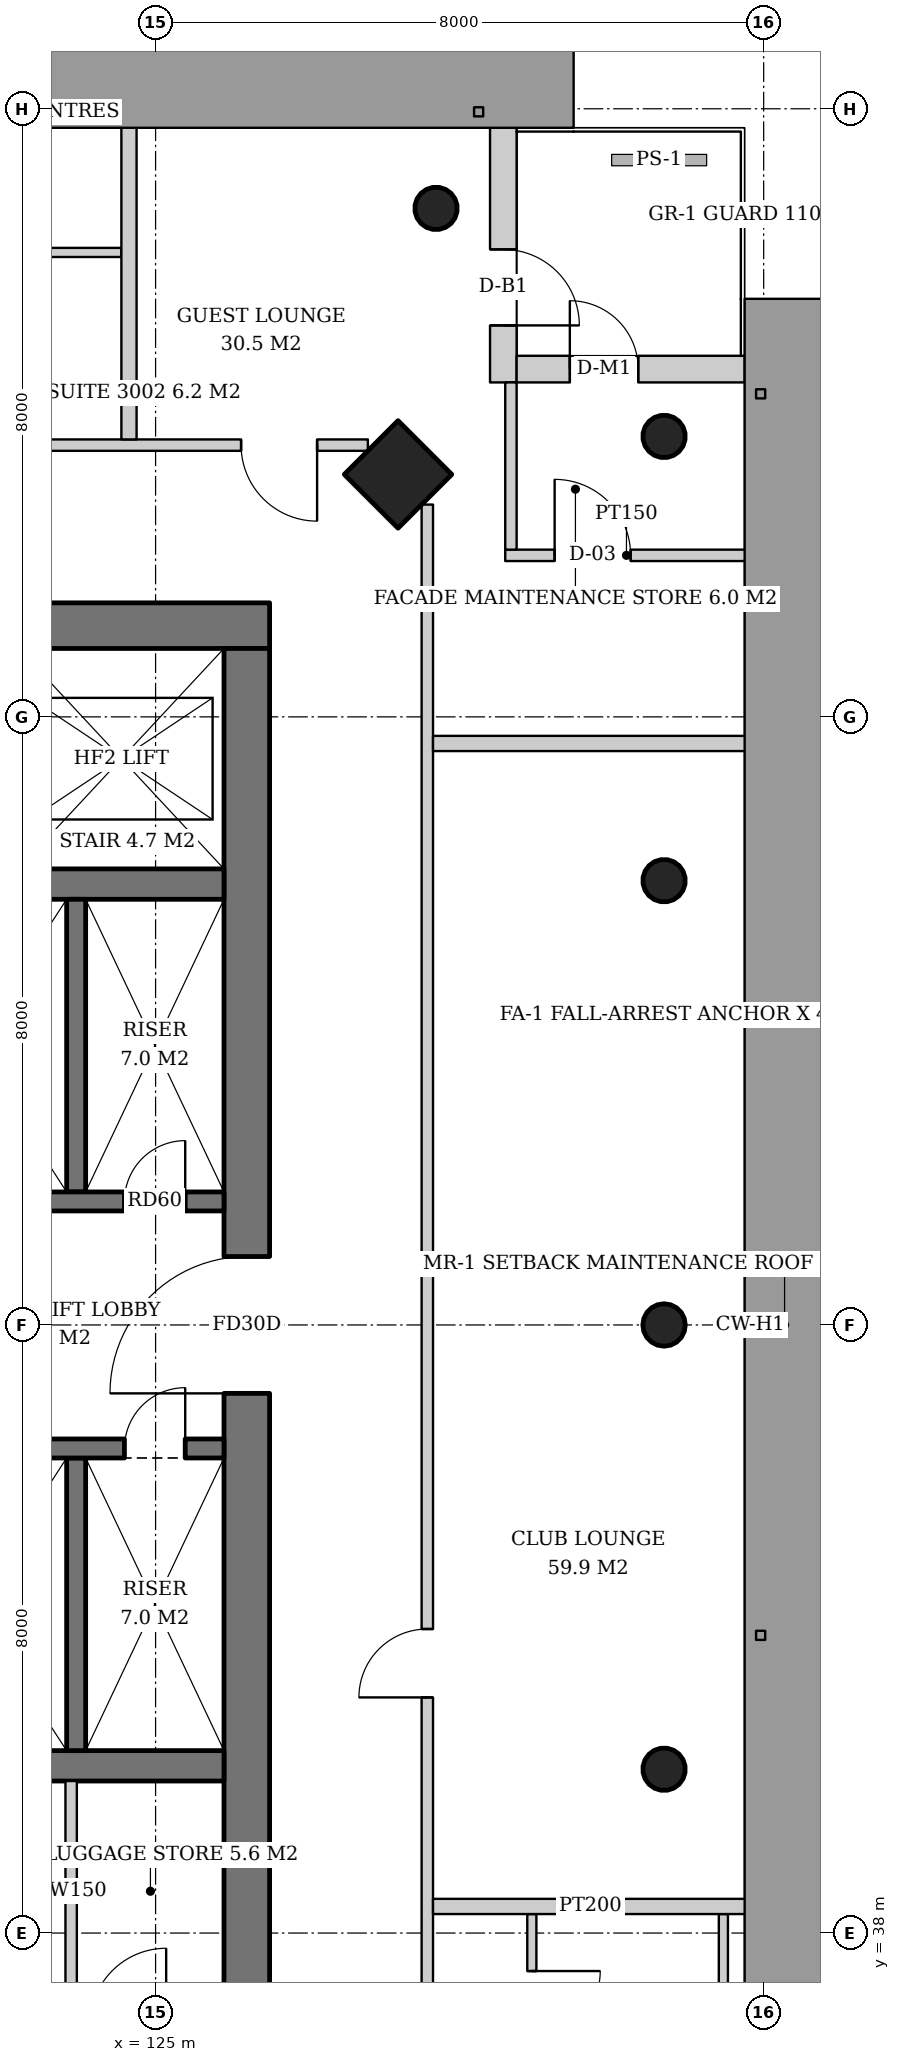
"""IFC4 building model, lengths in metres.
Left out: names, types, materials, properties, quantities, classifications, styles, units other than length and angle.
Written with IfcOpenShell. Run it as: python <this file> out.ifc"""

import sys

from ifc_helpers import new_model, si_unit, direction, frame, frame_2d, origin, origin_2d, place, context, subcontext, project, spatial, rectangle, hollow_circle, extrude, element, fill, save


model = new_model("IFC4")
c1 = context("Model", 3, precision=1e-05, world=origin(), true_north=direction((0.0, 1.0)))
c2 = subcontext(c1, "Body", "Model", "MODEL_VIEW")
j1 = project(units=[si_unit("LENGTHUNIT", "METRE"), si_unit("PLANEANGLEUNIT", "RADIAN")], contexts=[c1])
p1 = place(None, origin())
s1 = spatial("IfcSite", under=j1, at=p1, CompositionType="ELEMENT")
p2 = place(p1, origin())
s2 = spatial("IfcBuilding", under=s1, at=p2, CompositionType="ELEMENT")
p3 = place(p2, frame((0.0, 0.0, 119.8)))
s3 = spatial("IfcBuildingStorey", under=s2, at=p3, CompositionType="ELEMENT", Elevation=119.8)
p4 = place(p3, frame((128.241, 57.241, 0.0), z_axis=(-0.043029647111, -0.043029647111, 0.998146732169), x_axis=(0.707106781187, -0.707106781187, 0.0)))
e1 = element("IfcColumn", 1, at=p4, inside=s3, PredefinedType="COLUMN", context=c2, shape_type="SweptSolid", body=[
    extrude(rectangle(XDim=1.0, YDim=1.0, at=origin_2d()), origin(), (0.0, 0.0, 1.0), 3.807),
])
p5 = place(p3, frame((131.741, 57.741, 0.0), z_axis=(-0.043029647111, -0.043029647111, 0.998146732169), x_axis=(0.707106781187, -0.707106781187, 0.0)))
e2 = element("IfcColumn", 2, at=p5, inside=s3, PredefinedType="COLUMN", context=c2, shape_type="SweptSolid", body=[
    extrude(hollow_circle(Radius=0.28, WallThickness=0.02, at=origin_2d()), origin(), (0.0, 0.0, 1.0), 3.807),
])
p6 = place(p3, frame((131.741, 40.129, 0.0), z_axis=(-0.043059584825, 0.021497706284, 0.998841188968), x_axis=(-0.446680166538, -0.894693706707, 0.0)))
e3 = element("IfcColumn", 3, at=p6, inside=s3, PredefinedType="COLUMN", context=c2, shape_type="SweptSolid", body=[
    extrude(hollow_circle(Radius=0.28, WallThickness=0.02, at=origin_2d()), origin(), (0.0, 0.0, 1.0), 3.804),
])
p7 = place(p3, frame((131.741, 46.0, 0.0), z_axis=(-0.043069538298, 0.0, 0.999072076915), x_axis=(0.0, -1.0, 0.0)))
e4 = element("IfcColumn", 4, at=p7, inside=s3, PredefinedType="COLUMN", context=c2, shape_type="SweptSolid", body=[
    extrude(hollow_circle(Radius=0.28, WallThickness=0.02, at=origin_2d()), origin(), (0.0, 0.0, 1.0), 3.803),
])
p8 = place(p3, frame((131.741, 51.871, 0.0), z_axis=(-0.043059584825, -0.021497706284, 0.998841188968), x_axis=(0.446680166538, -0.894693706707, 0.0)))
e5 = element("IfcColumn", 5, at=p8, inside=s3, PredefinedType="COLUMN", context=c2, shape_type="SweptSolid", body=[
    extrude(hollow_circle(Radius=0.28, WallThickness=0.02, at=origin_2d()), origin(), (0.0, 0.0, 1.0), 3.804),
])
p9 = place(p3, frame((128.741, 60.741, 0.0), z_axis=(-0.043029647111, -0.043029647111, 0.998146732169), x_axis=(0.707106781187, -0.707106781187, 0.0)))
e6 = element("IfcColumn", 6, at=p9, inside=s3, PredefinedType="COLUMN", context=c2, shape_type="SweptSolid", body=[
    extrude(hollow_circle(Radius=0.28, WallThickness=0.02, at=origin_2d()), origin(), (0.0, 0.0, 1.0), 3.807),
])
p10 = place(p3, frame((107.5, 55.2, 0.0), z_axis=(0.0, 0.0, 1.0), x_axis=(1.0, 0.0, 0.0)))
e7 = element("IfcWall", 7, at=p10, inside=s3, PredefinedType="SHEAR", context=c2, shape_type="SweptSolid", body=[
    extrude(rectangle(XDim=19.0, YDim=0.6, at=frame_2d((9.5, 0.0))), origin(), (0.0, 0.0, 1.0), 3.8),
])
p11 = place(p10, frame((14.14, 0.0, 0.0)))
e8 = element("IfcOpeningElement", 8, at=p11, cuts=e7, PredefinedType="OPENING", context=c2, shape_type="SweptSolid", body=[
    extrude(rectangle(XDim=1.0, YDim=2.1, at=frame_2d((0.5, 1.05))), frame((0.0, 0.31, 0.0), z_axis=(0.0, -1.0, 0.0), x_axis=(1.0, 0.0, 0.0)), (0.0, 0.0, 1.0), 0.62),
])
p12 = place(p10, frame((2.425, 0.0, 0.0)))
e9 = element("IfcOpeningElement", 9, at=p12, cuts=e7, PredefinedType="OPENING", context=c2, shape_type="SweptSolid", body=[
    extrude(rectangle(XDim=1.0, YDim=2.1, at=frame_2d((0.5, 1.05))), frame((0.0, 0.31, 0.0), z_axis=(0.0, -1.0, 0.0), x_axis=(1.0, 0.0, 0.0)), (0.0, 0.0, 1.0), 0.62),
])
p13 = place(p3, frame((126.2, 37.1, 0.0), z_axis=(0.0, 0.0, 1.0), x_axis=(0.0, 1.0, 0.0)))
e10 = element("IfcWall", 10, at=p13, inside=s3, PredefinedType="SHEAR", context=c2, shape_type="SweptSolid", body=[
    extrude(rectangle(XDim=17.8, YDim=0.6, at=frame_2d((8.9, 0.0))), origin(), (0.0, 0.0, 1.0), 3.8),
])
p14 = place(p13, frame((8.0, 0.0, 0.0)))
e11 = element("IfcOpeningElement", 11, at=p14, cuts=e10, PredefinedType="OPENING", context=c2, shape_type="SweptSolid", body=[
    extrude(rectangle(XDim=1.8, YDim=2.4, at=frame_2d((0.9, 1.2))), frame((0.0, 0.31, 0.0), z_axis=(0.0, -1.0, 0.0), x_axis=(1.0, 0.0, 0.0)), (0.0, 0.0, 1.0), 0.62),
])
for number, where, z_axis, x_axis in (
    (12, (108.1, 40.2, 0.0), (0.0, 0.0, 1.0), (1.0, 0.0, 0.0)),
    (13, (108.1, 51.8, 0.0), (0.0, 0.0, 1.0), (1.0, 0.0, 0.0)),
):
    element("IfcWall", number, at=place(p3, frame(where, z_axis=z_axis, x_axis=x_axis)), inside=s3, PredefinedType="SHEAR", context=c2, shape_type="SweptSolid", body=[
        extrude(rectangle(XDim=17.8, YDim=0.4, at=frame_2d((8.9, 0.0))), origin(), (0.0, 0.0, 1.0), 3.8),
    ])
p15 = place(p3, frame((129.575, 61.75, 0.0), z_axis=(0.0, 0.0, 1.0), x_axis=(0.0, -1.0, 0.0)))
e14 = element("IfcWall", 14, at=p15, inside=s3, PredefinedType="SOLIDWALL", context=c2, shape_type="SweptSolid", body=[
    extrude(rectangle(XDim=3.35, YDim=0.35, at=frame_2d((1.675, 0.0))), origin(), (0.0, 0.0, 1.0), 3.6),
])
p16 = place(p15, frame((1.6, 0.0, 0.0)))
e15 = element("IfcOpeningElement", 15, at=p16, cuts=e14, PredefinedType="OPENING", context=c2, shape_type="SweptSolid", body=[
    extrude(rectangle(XDim=1.0, YDim=2.4, at=frame_2d((0.5, 1.2))), frame((0.0, 0.185, 0.0), z_axis=(0.0, -1.0, 0.0), x_axis=(1.0, 0.0, 0.0)), (0.0, 0.0, 1.0), 0.37),
])
p17 = place(p3, frame((129.75, 58.575, 0.0), z_axis=(0.0, 0.0, 1.0), x_axis=(1.0, 0.0, 0.0)))
e16 = element("IfcWall", 16, at=p17, inside=s3, PredefinedType="SOLIDWALL", context=c2, shape_type="SweptSolid", body=[
    extrude(rectangle(XDim=3.0, YDim=0.35, at=frame_2d((1.5, 0.0))), origin(), (0.0, 0.0, 1.0), 3.6),
])
p18 = place(p17, frame((0.7, 0.0, 0.0)))
e17 = element("IfcOpeningElement", 17, at=p18, cuts=e16, PredefinedType="OPENING", context=c2, shape_type="SweptSolid", body=[
    extrude(rectangle(XDim=0.9, YDim=2.1, at=frame_2d((0.45, 1.05))), frame((0.0, 0.185, 0.0), z_axis=(0.0, -1.0, 0.0), x_axis=(1.0, 0.0, 0.0)), (0.0, 0.0, 1.0), 0.37),
])
p19 = place(p3, frame((123.955, 47.75, 0.0), z_axis=(0.0, 0.0, 1.0), x_axis=(0.0, 1.0, 0.0)))
e18 = element("IfcWall", 18, at=p19, inside=s3, PredefinedType="SHEAR", context=c2, shape_type="SweptSolid", body=[
    extrude(rectangle(XDim=3.85, YDim=0.25, at=frame_2d((1.925, 0.0))), origin(), (0.0, 0.0, 1.0), 3.8),
])
p20 = place(p3, frame((121.33, 47.625, 0.0), z_axis=(0.0, 0.0, 1.0), x_axis=(1.0, 0.0, 0.0)))
e19 = element("IfcWall", 19, at=p20, inside=s3, PredefinedType="SHEAR", context=c2, shape_type="SweptSolid", body=[
    extrude(rectangle(XDim=4.57, YDim=0.25, at=frame_2d((2.285, 0.0))), origin(), (0.0, 0.0, 1.0), 3.8),
])
p21 = place(p20, frame((0.55, 0.0, 0.0)))
e20 = element("IfcOpeningElement", 20, at=p21, cuts=e19, PredefinedType="OPENING", context=c2, shape_type="SweptSolid", body=[
    extrude(rectangle(XDim=1.4, YDim=2.4, at=frame_2d((0.7, 1.2))), frame((0.0, 0.135, 0.0), z_axis=(0.0, -1.0, 0.0), x_axis=(1.0, 0.0, 0.0)), (0.0, 0.0, 1.0), 0.27),
])
p22 = place(p20, frame((3.26, 0.0, 0.0)))
e21 = element("IfcOpeningElement", 21, at=p22, cuts=e19, PredefinedType="OPENING", context=c2, shape_type="SweptSolid", body=[
    extrude(rectangle(XDim=0.8, YDim=2.0, at=frame_2d((0.4, 1.0))), frame((0.0, 0.135, 0.0), z_axis=(0.0, -1.0, 0.0), x_axis=(1.0, 0.0, 0.0)), (0.0, 0.0, 1.0), 0.27),
])
p23 = place(p3, frame((123.955, 44.25, 0.0), z_axis=(0.0, 0.0, 1.0), x_axis=(0.0, -1.0, 0.0)))
e22 = element("IfcWall", 22, at=p23, inside=s3, PredefinedType="SHEAR", context=c2, shape_type="SweptSolid", body=[
    extrude(rectangle(XDim=3.85, YDim=0.25, at=frame_2d((1.925, 0.0))), origin(), (0.0, 0.0, 1.0), 3.8),
])
p24 = place(p3, frame((121.33, 44.375, 0.0), z_axis=(0.0, 0.0, 1.0), x_axis=(1.0, 0.0, 0.0)))
e23 = element("IfcWall", 23, at=p24, inside=s3, PredefinedType="SHEAR", context=c2, shape_type="SweptSolid", body=[
    extrude(rectangle(XDim=4.57, YDim=0.25, at=frame_2d((2.285, 0.0))), origin(), (0.0, 0.0, 1.0), 3.8),
])
p25 = place(p24, frame((0.55, 0.0, 0.0)))
e24 = element("IfcOpeningElement", 24, at=p25, cuts=e23, PredefinedType="OPENING", context=c2, shape_type="SweptSolid", body=[
    extrude(rectangle(XDim=1.4, YDim=2.4, at=frame_2d((0.7, 1.2))), frame((0.0, 0.135, 0.0), z_axis=(0.0, -1.0, 0.0), x_axis=(1.0, 0.0, 0.0)), (0.0, 0.0, 1.0), 0.27),
])
p26 = place(p24, frame((3.26, 0.0, 0.0)))
e25 = element("IfcOpeningElement", 25, at=p26, cuts=e23, PredefinedType="OPENING", context=c2, shape_type="SweptSolid", body=[
    extrude(rectangle(XDim=0.8, YDim=2.0, at=frame_2d((0.4, 1.0))), frame((0.0, 0.135, 0.0), z_axis=(0.0, -1.0, 0.0), x_axis=(1.0, 0.0, 0.0)), (0.0, 0.0, 1.0), 0.27),
])
p27 = place(p3, frame((123.889, 37.1, 0.0), z_axis=(0.0, 0.0, 1.0), x_axis=(0.0, 1.0, 0.0)))
e26 = element("IfcWall", 26, at=p27, inside=s3, PredefinedType="SOLIDWALL", context=c2, shape_type="SweptSolid", body=[
    extrude(rectangle(XDim=2.9, YDim=0.15, at=frame_2d((1.45, 0.0))), origin(), (0.0, 0.0, 1.0), 3.6),
])
p28 = place(p3, frame((129.95, 38.25, 0.0), z_axis=(0.0, 0.0, 1.0), x_axis=(0.0, -1.0, 0.0)))
e27 = element("IfcWall", 27, at=p28, inside=s3, PredefinedType="PARTITIONING", context=c2, shape_type="SweptSolid", body=[
    extrude(rectangle(XDim=2.58, YDim=0.12, at=frame_2d((1.29, 0.0))), origin(), (0.0, 0.0, 1.0), 2.9),
])
p29 = place(p28, frame((0.75, 0.0, 0.0)))
e28 = element("IfcOpeningElement", 28, at=p29, cuts=e27, PredefinedType="OPENING", context=c2, shape_type="SweptSolid", body=[
    extrude(rectangle(XDim=0.9, YDim=2.1, at=frame_2d((0.45, 1.05))), frame((0.0, 0.07, 0.0), z_axis=(0.0, -1.0, 0.0), x_axis=(1.0, 0.0, 0.0)), (0.0, 0.0, 1.0), 0.14),
])
p30 = place(p3, frame((132.47, 38.25, 0.0), z_axis=(0.0, 0.0, 1.0), x_axis=(0.0, -1.0, 0.0)))
e29 = element("IfcWall", 29, at=p30, inside=s3, PredefinedType="PARTITIONING", context=c2, shape_type="SweptSolid", body=[
    extrude(rectangle(XDim=2.58, YDim=0.12, at=frame_2d((1.29, 0.0))), origin(), (0.0, 0.0, 1.0), 3.6),
])
p31 = place(p3, frame((128.575, 35.207, 0.0), z_axis=(0.0, 0.0, 1.0), x_axis=(0.0, 1.0, 0.0)))
e30 = element("IfcWall", 30, at=p31, inside=s3, PredefinedType="PARTITIONING", context=c2, shape_type="SweptSolid", body=[
    extrude(rectangle(XDim=21.586, YDim=0.15, at=frame_2d((10.793, 0.0))), origin(), (0.0, 0.0, 1.0), 2.9),
])
p32 = place(p31, frame((0.718, 0.0, 0.0)))
e31 = element("IfcOpeningElement", 31, at=p32, cuts=e30, PredefinedType="OPENING", context=c2, shape_type="SweptSolid", body=[
    extrude(rectangle(XDim=0.9, YDim=2.1, at=frame_2d((0.45, 1.05))), frame((0.0, 0.085, 0.0), z_axis=(0.0, -1.0, 0.0), x_axis=(1.0, 0.0, 0.0)), (0.0, 0.0, 1.0), 0.17),
])
p33 = place(p31, frame((5.893, 0.0, 0.0)))
e32 = element("IfcOpeningElement", 32, at=p33, cuts=e30, PredefinedType="OPENING", context=c2, shape_type="SweptSolid", body=[
    extrude(rectangle(XDim=0.9, YDim=2.1, at=frame_2d((0.45, 1.05))), frame((0.0, 0.085, 0.0), z_axis=(0.0, -1.0, 0.0), x_axis=(1.0, 0.0, 0.0)), (0.0, 0.0, 1.0), 0.17),
])
for number, where, z_axis, x_axis in (
    (33, (128.65, 38.35, 0.0), (0.0, 0.0, 1.0), (1.0, 0.0, 0.0)),
    (34, (128.65, 53.65, 0.0), (0.0, 0.0, 1.0), (1.0, 0.0, 0.0)),
):
    element("IfcWall", number, at=place(p3, frame(where, z_axis=z_axis, x_axis=x_axis)), inside=s3, PredefinedType="PARTITIONING", context=c2, shape_type="SweptSolid", body=[
        extrude(rectangle(XDim=4.14, YDim=0.2, at=frame_2d((2.07, 0.0))), origin(), (0.0, 0.0, 1.0), 3.2),
    ])
p34 = place(p3, frame((124.55, 60.11, 0.0), z_axis=(0.0, 0.0, 1.0), x_axis=(-1.0, 0.0, 0.0)))
e35 = element("IfcWall", 35, at=p34, inside=s3, PredefinedType="PARTITIONING", context=c2, shape_type="SweptSolid", body=[
    extrude(rectangle(XDim=2.42, YDim=0.12, at=frame_2d((1.21, 0.0))), origin(), (0.0, 0.0, 1.0), 3.0),
])
p35 = place(p3, frame((127.793, 57.575, 0.0), z_axis=(0.0, 0.0, 1.0), x_axis=(-1.0, 0.0, 0.0)))
e36 = element("IfcWall", 36, at=p35, inside=s3, PredefinedType="PARTITIONING", context=c2, shape_type="SweptSolid", body=[
    extrude(rectangle(XDim=21.586, YDim=0.15, at=frame_2d((10.793, 0.0))), origin(), (0.0, 0.0, 1.0), 2.9),
])
p36 = place(p35, frame((0.668, 0.0, 0.0)))
e37 = element("IfcOpeningElement", 37, at=p36, cuts=e36, PredefinedType="OPENING", context=c2, shape_type="SweptSolid", body=[
    extrude(rectangle(XDim=1.0, YDim=2.1, at=frame_2d((0.5, 1.05))), frame((0.0, 0.085, 0.0), z_axis=(0.0, -1.0, 0.0), x_axis=(1.0, 0.0, 0.0)), (0.0, 0.0, 1.0), 0.17),
])
p37 = place(p35, frame((5.893, 0.0, 0.0)))
e38 = element("IfcOpeningElement", 38, at=p37, cuts=e36, PredefinedType="OPENING", context=c2, shape_type="SweptSolid", body=[
    extrude(rectangle(XDim=0.9, YDim=2.1, at=frame_2d((0.45, 1.05))), frame((0.0, 0.085, 0.0), z_axis=(0.0, -1.0, 0.0), x_axis=(1.0, 0.0, 0.0)), (0.0, 0.0, 1.0), 0.17),
])
p38 = place(p35, frame((16.043, 0.0, 0.0)))
e39 = element("IfcOpeningElement", 39, at=p38, cuts=e36, PredefinedType="OPENING", context=c2, shape_type="SweptSolid", body=[
    extrude(rectangle(XDim=1.0, YDim=2.1, at=frame_2d((0.5, 1.05))), frame((0.0, 0.085, 0.0), z_axis=(0.0, -1.0, 0.0), x_axis=(1.0, 0.0, 0.0)), (0.0, 0.0, 1.0), 0.17),
])
p39 = place(p3, frame((124.65, 57.65, 0.0), z_axis=(0.0, 0.0, 1.0), x_axis=(0.0, 1.0, 0.0)))
e40 = element("IfcWall", 40, at=p39, inside=s3, PredefinedType="PARTITIONING", context=c2, shape_type="SweptSolid", body=[
    extrude(rectangle(XDim=4.14, YDim=0.2, at=frame_2d((2.07, 0.0))), origin(), (0.0, 0.0, 1.0), 3.2),
])
p40 = place(p3, frame((129.6, 56.125, 0.0), z_axis=(0.0, 0.0, 1.0), x_axis=(1.0, 0.0, 0.0)))
e41 = element("IfcWall", 41, at=p40, inside=s3, PredefinedType="PARTITIONING", context=c2, shape_type="SweptSolid", body=[
    extrude(rectangle(XDim=3.19, YDim=0.15, at=frame_2d((1.595, 0.0))), origin(), (0.0, 0.0, 1.0), 3.2),
])
p41 = place(p40, frame((0.65, 0.0, 0.0)))
e42 = element("IfcOpeningElement", 42, at=p41, cuts=e41, PredefinedType="OPENING", context=c2, shape_type="SweptSolid", body=[
    extrude(rectangle(XDim=1.0, YDim=2.1, at=frame_2d((0.5, 1.05))), frame((0.0, 0.085, 0.0), z_axis=(0.0, -1.0, 0.0), x_axis=(1.0, 0.0, 0.0)), (0.0, 0.0, 1.0), 0.17),
])
p42 = place(p3, frame((129.675, 56.2, 0.0), z_axis=(0.0, 0.0, 1.0), x_axis=(0.0, 1.0, 0.0)))
e43 = element("IfcWall", 43, at=p42, inside=s3, PredefinedType="PARTITIONING", context=c2, shape_type="SweptSolid", body=[
    extrude(rectangle(XDim=2.2, YDim=0.15, at=frame_2d((1.1, 0.0))), origin(), (0.0, 0.0, 1.0), 3.2),
])
p43 = place(p18, origin())
e44 = element("IfcDoor", 44, at=p43, inside=s3, OperationType="SINGLE_SWING_LEFT", PredefinedType="DOOR", context=c2, shape_type="SweptSolid", body=[
    extrude(rectangle(XDim=0.9, YDim=2.1, at=frame_2d((0.45, 1.05))), frame((0.0, 0.025, 0.0), z_axis=(0.0, -1.0, 0.0), x_axis=(1.0, 0.0, 0.0)), (0.0, 0.0, 1.0), 0.05),
])
fill(e17, e44)
p44 = place(p16, origin())
e45 = element("IfcDoor", 45, at=p44, inside=s3, OperationType="SINGLE_SWING_RIGHT", PredefinedType="DOOR", context=c2, shape_type="SweptSolid", body=[
    extrude(rectangle(XDim=1.0, YDim=2.4, at=frame_2d((0.5, 1.2))), frame((0.0, 0.025, 0.0), z_axis=(0.0, -1.0, 0.0), x_axis=(1.0, 0.0, 0.0)), (0.0, 0.0, 1.0), 0.05),
])
fill(e15, e45)
p45 = place(p22, origin())
e46 = element("IfcDoor", 46, at=p45, inside=s3, OperationType="SINGLE_SWING_RIGHT", PredefinedType="DOOR", context=c2, shape_type="SweptSolid", body=[
    extrude(rectangle(XDim=0.8, YDim=2.0, at=frame_2d((0.4, 1.0))), frame((0.0, 0.025, 0.0), z_axis=(0.0, -1.0, 0.0), x_axis=(1.0, 0.0, 0.0)), (0.0, 0.0, 1.0), 0.05),
])
fill(e21, e46)
p46 = place(p26, origin())
e47 = element("IfcDoor", 47, at=p46, inside=s3, OperationType="SINGLE_SWING_RIGHT", PredefinedType="DOOR", context=c2, shape_type="SweptSolid", body=[
    extrude(rectangle(XDim=0.8, YDim=2.0, at=frame_2d((0.4, 1.0))), frame((0.0, 0.025, 0.0), z_axis=(0.0, -1.0, 0.0), x_axis=(1.0, 0.0, 0.0)), (0.0, 0.0, 1.0), 0.05),
])
fill(e25, e47)
p47 = place(p14, origin())
e48 = element("IfcDoor", 48, at=p47, inside=s3, OperationType="DOUBLE_DOOR_SINGLE_SWING", PredefinedType="DOOR", context=c2, shape_type="SweptSolid", body=[
    extrude(rectangle(XDim=1.8, YDim=2.4, at=frame_2d((0.9, 1.2))), frame((0.0, 0.025, 0.0), z_axis=(0.0, -1.0, 0.0), x_axis=(1.0, 0.0, 0.0)), (0.0, 0.0, 1.0), 0.05),
])
fill(e11, e48)
p48 = place(p29, origin())
e49 = element("IfcDoor", 49, at=p48, inside=s3, OperationType="SINGLE_SWING_LEFT", PredefinedType="DOOR", context=c2, shape_type="SweptSolid", body=[
    extrude(rectangle(XDim=0.9, YDim=2.1, at=frame_2d((0.45, 1.05))), frame((0.0, 0.025, 0.0), z_axis=(0.0, -1.0, 0.0), x_axis=(1.0, 0.0, 0.0)), (0.0, 0.0, 1.0), 0.05),
])
fill(e28, e49)
p49 = place(p33, origin())
e50 = element("IfcDoor", 50, at=p49, inside=s3, OperationType="SINGLE_SWING_LEFT", PredefinedType="DOOR", context=c2, shape_type="SweptSolid", body=[
    extrude(rectangle(XDim=0.9, YDim=2.1, at=frame_2d((0.45, 1.05))), frame((0.0, 0.025, 0.0), z_axis=(0.0, -1.0, 0.0), x_axis=(1.0, 0.0, 0.0)), (0.0, 0.0, 1.0), 0.05),
])
fill(e32, e50)
p50 = place(p36, origin())
e51 = element("IfcDoor", 51, at=p50, inside=s3, OperationType="SINGLE_SWING_LEFT", PredefinedType="DOOR", context=c2, shape_type="SweptSolid", body=[
    extrude(rectangle(XDim=1.0, YDim=2.1, at=frame_2d((0.5, 1.05))), frame((0.0, 0.025, 0.0), z_axis=(0.0, -1.0, 0.0), x_axis=(1.0, 0.0, 0.0)), (0.0, 0.0, 1.0), 0.05),
])
fill(e37, e51)
p51 = place(p41, origin())
e52 = element("IfcDoor", 52, at=p51, inside=s3, OperationType="SINGLE_SWING_LEFT", PredefinedType="DOOR", context=c2, shape_type="SweptSolid", body=[
    extrude(rectangle(XDim=1.0, YDim=2.1, at=frame_2d((0.5, 1.05))), frame((0.0, 0.025, 0.0), z_axis=(0.0, -1.0, 0.0), x_axis=(1.0, 0.0, 0.0)), (0.0, 0.0, 1.0), 0.05),
])
fill(e42, e52)
save(model, sys.argv[1])
